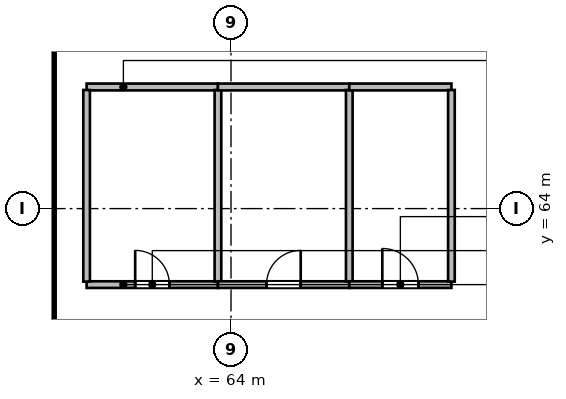
"""IFC4 building model, lengths in metres.
Left out: names, types, materials, properties, quantities, classifications, styles, units other than length and angle.
Written with IfcOpenShell. Run it as: python <this file> out.ifc"""

import sys

from ifc_helpers import new_model, si_unit, direction, frame, frame_2d, origin, place, context, subcontext, project, spatial, rectangle, extrude, source, transform, mapped, element, fill, save


model = new_model("IFC4")
c1 = context("Model", 3, precision=1e-05, world=origin(), true_north=direction((0.0, 1.0)))
c2 = subcontext(c1, "Body", "Model", "MODEL_VIEW")
j1 = project(units=[si_unit("LENGTHUNIT", "METRE"), si_unit("PLANEANGLEUNIT", "RADIAN")], contexts=[c1])
p1 = place(None, origin())
s1 = spatial("IfcSite", under=j1, at=p1, CompositionType="ELEMENT")
p2 = place(p1, origin())
s2 = spatial("IfcBuilding", under=s1, at=p2, CompositionType="ELEMENT")
p3 = place(p2, frame((0.0, 0.0, 6.0)))
s3 = spatial("IfcBuildingStorey", under=s2, at=p3, CompositionType="ELEMENT", Elevation=6.0)
m1 = source(origin(), c2, "Body", "SweptSolid", [
    extrude(rectangle(XDim=12.0, YDim=0.55, at=frame_2d((6.0, 0.0))), origin(), (0.0, 0.0, 1.0), 6.0),
])
p4 = place(p3, frame((59.075, 60.2, 0.0), z_axis=(0.0, 0.0, 1.0), x_axis=(0.0, 1.0, 0.0)))
e1 = element("IfcWall", 1, at=p4, inside=s3, PredefinedType="SHEAR", context=c2, shape_type="MappedRepresentation", body=[
    mapped(m1, transform((0.0, 0.0, 0.0), scale=1.0)),
])
m2 = source(origin(), c2, "Body", "SweptSolid", [
    extrude(rectangle(XDim=3.456, YDim=0.175, at=frame_2d((1.728, 0.0))), origin(), (0.0, 0.0, 1.0), 5.7),
])
p5 = place(p3, frame((60.2, 62.0, 0.0), z_axis=(0.0, 0.0, 1.0), x_axis=(1.0, 0.0, 0.0)))
e2 = element("IfcWall", 2, at=p5, inside=s3, PredefinedType="PARTITIONING", context=c2, shape_type="MappedRepresentation", body=[
    mapped(m2, transform((0.0, 0.0, 0.0), scale=1.0)),
])
p6 = place(p5, frame((1.278, 0.0, 0.0)))
e3 = element("IfcOpeningElement", 3, at=p6, cuts=e2, PredefinedType="OPENING", context=c2, shape_type="SweptSolid", body=[
    extrude(rectangle(XDim=0.9, YDim=2.08, at=frame_2d((0.45, 1.04))), frame((0.0, 0.098, 0.0), z_axis=(0.0, -1.0, 0.0), x_axis=(1.0, 0.0, 0.0)), (0.0, 0.0, 1.0), 0.195),
])
m3 = source(origin(), c2, "Body", "SweptSolid", [
    extrude(rectangle(XDim=3.456, YDim=0.18, at=frame_2d((1.728, 0.0))), origin(), (0.0, 0.0, 1.0), 5.7),
])
p7 = place(p3, frame((60.2, 67.2, 0.0), z_axis=(0.0, 0.0, 1.0), x_axis=(1.0, 0.0, 0.0)))
e4 = element("IfcWall", 4, at=p7, inside=s3, PredefinedType="PLUMBINGWALL", context=c2, shape_type="MappedRepresentation", body=[
    mapped(m3, transform((0.0, 0.0, 0.0), scale=1.0)),
])
m4 = source(origin(), c2, "Body", "SweptSolid", [
    extrude(rectangle(XDim=5.043, YDim=0.175, at=frame_2d((2.521, 0.0))), origin(), (0.0, 0.0, 1.0), 5.7),
])
for number, where, z_axis, x_axis in (
    (5, (60.2, 62.079, 0.0), (0.0, 0.0, 1.0), (0.0, 1.0, 0.0)),
    (6, (63.656, 62.079, 0.0), (0.0, 0.0, 1.0), (0.0, 1.0, 0.0)),
):
    element("IfcWall", number, at=place(p3, frame(where, z_axis=z_axis, x_axis=x_axis)), inside=s3, PredefinedType="PARTITIONING", context=c2, shape_type="MappedRepresentation", body=[
        mapped(m4, transform((0.0, 0.0, 0.0), scale=1.0)),
    ])
p8 = place(p3, frame((63.656, 62.0, 0.0), z_axis=(0.0, 0.0, 1.0), x_axis=(1.0, 0.0, 0.0)))
e7 = element("IfcWall", 7, at=p8, inside=s3, PredefinedType="PARTITIONING", context=c2, shape_type="MappedRepresentation", body=[
    mapped(m2, transform((0.0, 0.0, 0.0), scale=1.0)),
])
p9 = place(p8, frame((1.278, 0.0, 0.0)))
e8 = element("IfcOpeningElement", 8, at=p9, cuts=e7, PredefinedType="OPENING", context=c2, shape_type="SweptSolid", body=[
    extrude(rectangle(XDim=0.9, YDim=2.08, at=frame_2d((0.45, 1.04))), frame((0.0, 0.098, 0.0), z_axis=(0.0, -1.0, 0.0), x_axis=(1.0, 0.0, 0.0)), (0.0, 0.0, 1.0), 0.195),
])
p10 = place(p3, frame((63.656, 67.2, 0.0), z_axis=(0.0, 0.0, 1.0), x_axis=(1.0, 0.0, 0.0)))
e9 = element("IfcWall", 9, at=p10, inside=s3, PredefinedType="PLUMBINGWALL", context=c2, shape_type="MappedRepresentation", body=[
    mapped(m3, transform((0.0, 0.0, 0.0), scale=1.0)),
])
p11 = place(p3, frame((67.112, 62.079, 0.0), z_axis=(0.0, 0.0, 1.0), x_axis=(0.0, 1.0, 0.0)))
e10 = element("IfcWall", 10, at=p11, inside=s3, PredefinedType="PARTITIONING", context=c2, shape_type="MappedRepresentation", body=[
    mapped(m4, transform((0.0, 0.0, 0.0), scale=1.0)),
])
m5 = source(origin(), c2, "Body", "SweptSolid", [
    extrude(rectangle(XDim=2.688, YDim=0.175, at=frame_2d((1.344, 0.0))), origin(), (0.0, 0.0, 1.0), 5.7),
])
p12 = place(p3, frame((67.112, 62.0, 0.0), z_axis=(0.0, 0.0, 1.0), x_axis=(1.0, 0.0, 0.0)))
e11 = element("IfcWall", 11, at=p12, inside=s3, PredefinedType="PARTITIONING", context=c2, shape_type="MappedRepresentation", body=[
    mapped(m5, transform((0.0, 0.0, 0.0), scale=1.0)),
])
p13 = place(p12, frame((0.869, 0.0, 0.0)))
e12 = element("IfcOpeningElement", 12, at=p13, cuts=e11, PredefinedType="OPENING", context=c2, shape_type="SweptSolid", body=[
    extrude(rectangle(XDim=0.95, YDim=2.12, at=frame_2d((0.475, 1.06))), frame((0.0, 0.098, 0.0), z_axis=(0.0, -1.0, 0.0), x_axis=(1.0, 0.0, 0.0)), (0.0, 0.0, 1.0), 0.195),
])
m6 = source(origin(), c2, "Body", "SweptSolid", [
    extrude(rectangle(XDim=2.688, YDim=0.18, at=frame_2d((1.344, 0.0))), origin(), (0.0, 0.0, 1.0), 5.7),
])
p14 = place(p3, frame((67.112, 67.2, 0.0), z_axis=(0.0, 0.0, 1.0), x_axis=(1.0, 0.0, 0.0)))
e13 = element("IfcWall", 13, at=p14, inside=s3, PredefinedType="PLUMBINGWALL", context=c2, shape_type="MappedRepresentation", body=[
    mapped(m6, transform((0.0, 0.0, 0.0), scale=1.0)),
])
p15 = place(p3, frame((69.8, 62.079, 0.0), z_axis=(0.0, 0.0, 1.0), x_axis=(0.0, 1.0, 0.0)))
e14 = element("IfcWall", 14, at=p15, inside=s3, PredefinedType="PARTITIONING", context=c2, shape_type="MappedRepresentation", body=[
    mapped(m4, transform((0.0, 0.0, 0.0), scale=1.0)),
])
m7 = source(origin(), c2, "Body", "SweptSolid", [
    extrude(rectangle(XDim=0.9, YDim=2.08, at=frame_2d((0.45, 1.04))), frame((0.0, 0.025, 0.0), z_axis=(0.0, -1.0, 0.0), x_axis=(1.0, 0.0, 0.0)), (0.0, 0.0, 1.0), 0.05),
])
p16 = place(p6, origin())
e15 = element("IfcDoor", 15, at=p16, inside=s3, OperationType="SINGLE_SWING_LEFT", PredefinedType="DOOR", context=c2, shape_type="MappedRepresentation", body=[
    mapped(m7, transform((0.0, 0.0, 0.0), scale=1.0)),
])
fill(e3, e15)
p17 = place(p9, origin())
e16 = element("IfcDoor", 16, at=p17, inside=s3, OperationType="SINGLE_SWING_RIGHT", PredefinedType="DOOR", context=c2, shape_type="MappedRepresentation", body=[
    mapped(m7, transform((0.0, 0.0, 0.0), scale=1.0)),
])
fill(e8, e16)
m8 = source(origin(), c2, "Body", "SweptSolid", [
    extrude(rectangle(XDim=0.95, YDim=2.12, at=frame_2d((0.475, 1.06))), frame((0.0, 0.025, 0.0), z_axis=(0.0, -1.0, 0.0), x_axis=(1.0, 0.0, 0.0)), (0.0, 0.0, 1.0), 0.05),
])
p18 = place(p13, origin())
e17 = element("IfcDoor", 17, at=p18, inside=s3, OperationType="SINGLE_SWING_LEFT", PredefinedType="DOOR", context=c2, shape_type="MappedRepresentation", body=[
    mapped(m8, transform((0.0, 0.0, 0.0), scale=1.0)),
])
fill(e12, e17)
save(model, sys.argv[1])
